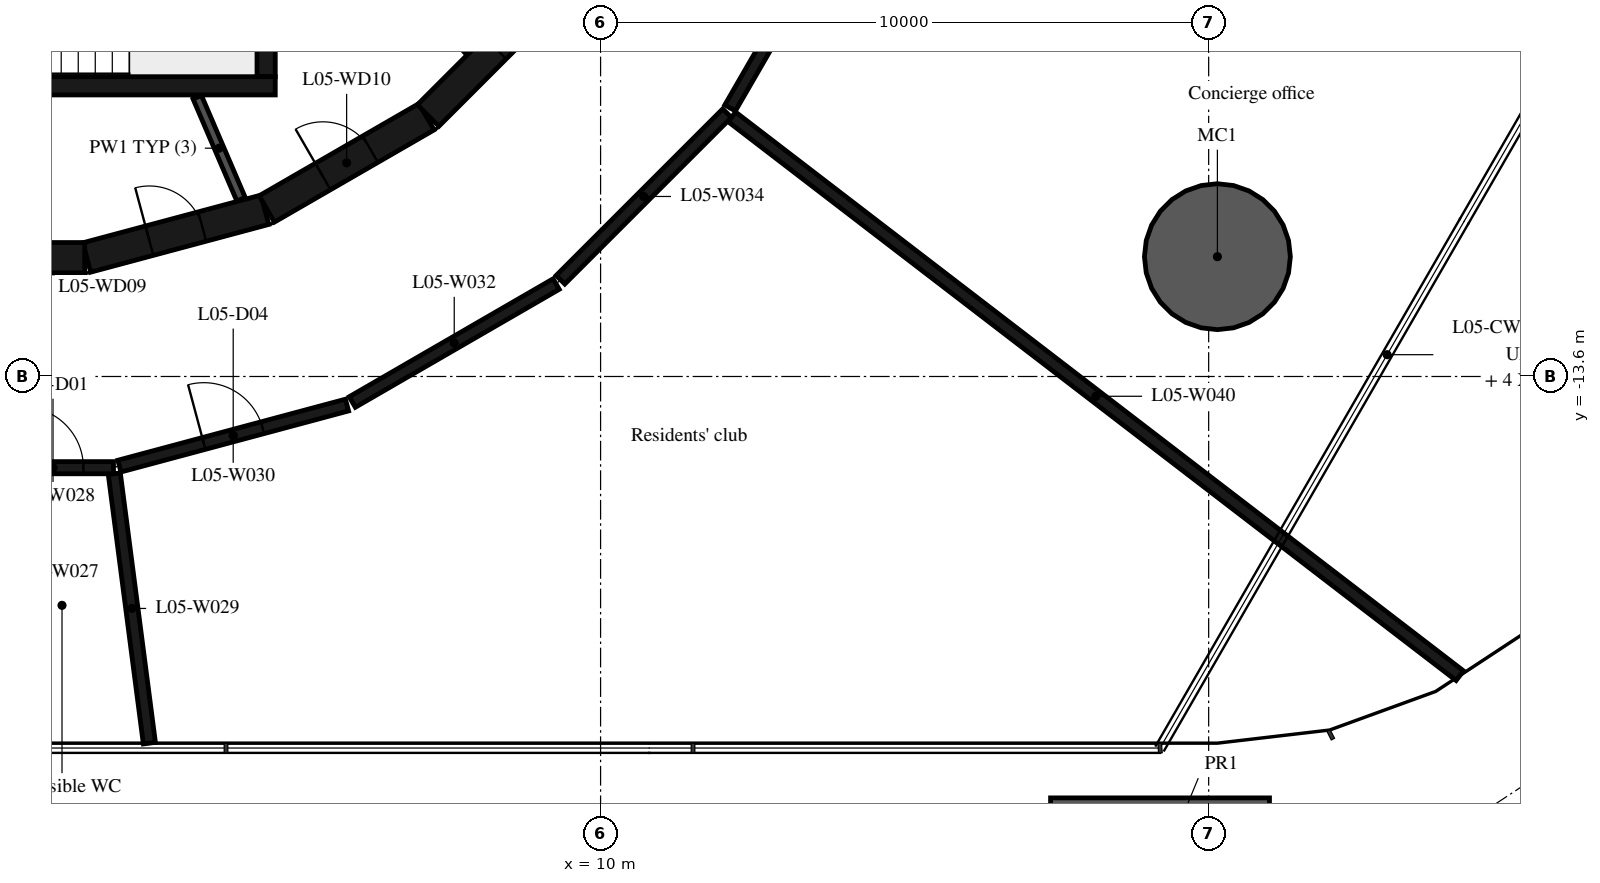
"""IFC4 building model, lengths in metres.
Left out: names, types, materials, properties, quantities, classifications, styles, units other than length and angle.
Written with IfcOpenShell. Run it as: python <this file> out.ifc"""

import sys

from ifc_helpers import new_model, si_unit, direction, frame, frame_2d, origin, origin_2d, place, context, subcontext, project, spatial, rectangle, hollow_circle, extrude, element, fill, save


model = new_model("IFC4")
c1 = context("Model", 3, precision=1e-05, world=origin(), true_north=direction((0.0, 1.0)))
c2 = subcontext(c1, "Body", "Model", "MODEL_VIEW")
j1 = project(units=[si_unit("LENGTHUNIT", "METRE"), si_unit("PLANEANGLEUNIT", "RADIAN")], contexts=[c1])
p1 = place(None, origin())
s1 = spatial("IfcSite", under=j1, at=p1, CompositionType="ELEMENT")
p2 = place(p1, origin())
s2 = spatial("IfcBuilding", under=s1, at=p2, CompositionType="ELEMENT")
p3 = place(p2, frame((0.0, 0.0, 28.2)))
s3 = spatial("IfcBuildingStorey", under=s2, at=p3, CompositionType="ELEMENT", Elevation=28.2)
p4 = place(p3, frame((20.144, -11.63, -0.38), z_axis=(0.0, 0.0, 1.0), x_axis=(1.0, 0.0, 0.0)))
e1 = element("IfcColumn", 1, at=p4, inside=s3, PredefinedType="COLUMN", context=c2, shape_type="SweptSolid", body=[
    extrude(hollow_circle(Radius=1.2, WallThickness=0.06, at=origin_2d()), origin(), (0.0, 0.0, 1.0), 4.73),
])
p5 = place(p3, frame((19.2, -21.73, -0.38), z_axis=(0.0, 0.0, 1.0), x_axis=(1.0, 0.0, 0.0)))
e2 = element("IfcColumn", 2, at=p5, inside=s3, PredefinedType="COLUMN", context=c2, shape_type="SweptSolid", body=[
    extrude(rectangle(XDim=3.6, YDim=2.4, at=origin_2d()), origin(), (0.0, 0.0, 1.0), 3.722),
])
p6 = place(p3, frame((1.55, -11.643, 0.0), z_axis=(0.0, 0.0, 1.0), x_axis=(0.965948410781, 0.258734743916, 0.0)))
e3 = element("IfcWall", 3, at=p6, inside=s3, PredefinedType="SHEAR", context=c2, shape_type="SweptSolid", body=[
    extrude(rectangle(XDim=3.033, YDim=0.5, at=frame_2d((1.516, 0.0))), origin(), (0.0, 0.0, 1.0), 4.35),
])
p7 = place(p6, frame((1.066, 0.0, 0.0)))
e4 = element("IfcOpeningElement", 4, at=p7, cuts=e3, PredefinedType="OPENING", context=c2, shape_type="SweptSolid", body=[
    extrude(rectangle(XDim=0.9, YDim=2.1, at=frame_2d((0.45, 1.05))), frame((0.0, 0.26, 0.0), z_axis=(0.0, -1.0, 0.0), x_axis=(1.0, 0.0, 0.0)), (0.0, 0.0, 1.0), 0.52),
])
p8 = place(p3, frame((4.51, -10.845, 0.0), z_axis=(0.0, 0.0, 1.0), x_axis=(0.865975092491, 0.500087131594, 0.0)))
e5 = element("IfcWall", 5, at=p8, inside=s3, PredefinedType="SHEAR", context=c2, shape_type="SweptSolid", body=[
    extrude(rectangle(XDim=3.033, YDim=0.5, at=frame_2d((1.516, 0.0))), origin(), (0.0, 0.0, 1.0), 4.35),
])
p9 = place(p8, frame((1.066, 0.0, 0.0)))
e6 = element("IfcOpeningElement", 6, at=p9, cuts=e5, PredefinedType="OPENING", context=c2, shape_type="SweptSolid", body=[
    extrude(rectangle(XDim=0.9, YDim=2.1, at=frame_2d((0.45, 1.05))), frame((0.0, 0.26, 0.0), z_axis=(0.0, -1.0, 0.0), x_axis=(1.0, 0.0, 0.0)), (0.0, 0.0, 1.0), 0.52),
])
p10 = place(p3, frame((7.164, -9.308, 0.0), z_axis=(0.0, 0.0, 1.0), x_axis=(0.707106781187, 0.707106781187, 0.0)))
e7 = element("IfcWall", 7, at=p10, inside=s3, PredefinedType="SHEAR", context=c2, shape_type="SweptSolid", body=[
    extrude(rectangle(XDim=3.032, YDim=0.5, at=frame_2d((1.516, 0.0))), origin(), (0.0, 0.0, 1.0), 4.35),
])
p11 = place(p10, frame((1.566, 0.0, 0.0)))
e8 = element("IfcOpeningElement", 8, at=p11, cuts=e7, PredefinedType="OPENING", context=c2, shape_type="SweptSolid", body=[
    extrude(rectangle(XDim=0.9, YDim=2.1, at=frame_2d((0.45, 1.05))), frame((0.0, 0.26, 0.0), z_axis=(0.0, -1.0, 0.0), x_axis=(1.0, 0.0, 0.0)), (0.0, 0.0, 1.0), 0.52),
])
p12 = place(p3, frame((-1.516, -11.647, 0.0), z_axis=(0.0, 0.0, 1.0), x_axis=(1.0, 0.0, 0.0)))
e9 = element("IfcWall", 9, at=p12, inside=s3, PredefinedType="SHEAR", context=c2, shape_type="SweptSolid", body=[
    extrude(rectangle(XDim=3.033, YDim=0.5, at=frame_2d((1.516, 0.0))), origin(), (0.0, 0.0, 1.0), 4.35),
])
p13 = place(p12, frame((0.016, 0.0, 0.0)))
e10 = element("IfcOpeningElement", 10, at=p13, cuts=e9, PredefinedType="OPENING", context=c2, shape_type="SweptSolid", body=[
    extrude(rectangle(XDim=1.2, YDim=2.1, at=frame_2d((0.6, 1.05))), frame((0.0, 0.26, 0.0), z_axis=(0.0, -1.0, 0.0), x_axis=(1.0, 0.0, 0.0)), (0.0, 0.0, 1.0), 0.52),
])
p14 = place(p3, frame((4.5, -8.67, 0.0), z_axis=(0.0, 0.0, 1.0), x_axis=(0.0, 1.0, 0.0)))
e11 = element("IfcWall", 11, at=p14, inside=s3, PredefinedType="SHEAR", context=c2, shape_type="SweptSolid", body=[
    extrude(rectangle(XDim=3.32, YDim=0.3, at=frame_2d((1.66, 0.0))), origin(), (0.0, 0.0, 1.0), 4.35),
])
p15 = place(p3, frame((0.1, -8.82, 0.0), z_axis=(0.0, 0.0, 1.0), x_axis=(1.0, 0.0, 0.0)))
e12 = element("IfcWall", 12, at=p15, inside=s3, PredefinedType="SHEAR", context=c2, shape_type="SweptSolid", body=[
    extrude(rectangle(XDim=4.55, YDim=0.3, at=frame_2d((2.275, 0.0))), origin(), (0.0, 0.0, 1.0), 4.35),
])
p16 = place(p3, frame((7.842, -8.248, 0.0), z_axis=(0.0, 0.0, 1.0), x_axis=(-0.66446128181, 0.747322691329, 0.0)))
e13 = element("IfcWall", 13, at=p16, inside=s3, PredefinedType="PARTITIONING", context=c2, shape_type="SweptSolid", body=[
    extrude(rectangle(XDim=4.198, YDim=0.15, at=frame_2d((2.099, 0.0))), origin(), (0.0, 0.0, 1.0), 4.35),
])
p17 = place(p3, frame((3.367, -9.007, 0.0), z_axis=(0.0, 0.0, 1.0), x_axis=(0.394387482265, -0.918944238696, 0.0)))
e14 = element("IfcWall", 14, at=p17, inside=s3, PredefinedType="PARTITIONING", context=c2, shape_type="SweptSolid", body=[
    extrude(rectangle(XDim=1.825, YDim=0.15, at=frame_2d((0.913, 0.0))), origin(), (0.0, 0.0, 1.0), 4.35),
])
p18 = place(p3, frame((0.0, -15.1, 0.0), z_axis=(0.0, 0.0, 1.0), x_axis=(1.0, 0.0, 0.0)))
e15 = element("IfcWall", 15, at=p18, inside=s3, PredefinedType="PARTITIONING", context=c2, shape_type="SweptSolid", body=[
    extrude(rectangle(XDim=1.99, YDim=0.2, at=frame_2d((0.995, 0.0))), origin(), (0.0, 0.0, 1.0), 4.35),
])
p19 = place(p18, frame((0.495, 0.0, 0.0)))
e16 = element("IfcOpeningElement", 16, at=p19, cuts=e15, PredefinedType="OPENING", context=c2, shape_type="SweptSolid", body=[
    extrude(rectangle(XDim=1.0, YDim=2.1, at=frame_2d((0.5, 1.05))), frame((0.0, 0.11, 0.0), z_axis=(0.0, -1.0, 0.0), x_axis=(1.0, 0.0, 0.0)), (0.0, 0.0, 1.0), 0.22),
])
p20 = place(p3, frame((2.003, -15.199, 0.0), z_axis=(0.0, 0.0, 1.0), x_axis=(0.129170993983, -0.991622334517, 0.0)))
e17 = element("IfcWall", 17, at=p20, inside=s3, PredefinedType="PARTITIONING", context=c2, shape_type="SweptSolid", body=[
    extrude(rectangle(XDim=4.468, YDim=0.2, at=frame_2d((2.234, 0.0))), origin(), (0.0, 0.0, 1.0), 4.35),
])
p21 = place(p3, frame((2.087, -15.074, 0.0), z_axis=(0.0, 0.0, 1.0), x_axis=(0.965870133458, 0.259026804199, 0.0)))
e18 = element("IfcWall", 18, at=p21, inside=s3, PredefinedType="PARTITIONING", context=c2, shape_type="SweptSolid", body=[
    extrude(rectangle(XDim=3.876, YDim=0.2, at=frame_2d((1.938, 0.0))), origin(), (0.0, 0.0, 1.0), 4.35),
])
p22 = place(p21, frame((1.438, 0.0, 0.0)))
e19 = element("IfcOpeningElement", 19, at=p22, cuts=e18, PredefinedType="OPENING", context=c2, shape_type="SweptSolid", body=[
    extrude(rectangle(XDim=1.0, YDim=2.1, at=frame_2d((0.5, 1.05))), frame((0.0, 0.11, 0.0), z_axis=(0.0, -1.0, 0.0), x_axis=(1.0, 0.0, 0.0)), (0.0, 0.0, 1.0), 0.22),
])
p23 = place(p3, frame((5.917, -14.02, 0.0), z_axis=(0.0, 0.0, 1.0), x_axis=(0.865601686425, 0.500733182901, 0.0)))
e20 = element("IfcWall", 20, at=p23, inside=s3, PredefinedType="PARTITIONING", context=c2, shape_type="SweptSolid", body=[
    extrude(rectangle(XDim=3.874, YDim=0.2, at=frame_2d((1.937, 0.0))), origin(), (0.0, 0.0, 1.0), 4.35),
])
p24 = place(p3, frame((9.341, -12.009, 0.0), z_axis=(0.0, 0.0, 1.0), x_axis=(0.707106781187, 0.707106781187, 0.0)))
e21 = element("IfcWall", 21, at=p24, inside=s3, PredefinedType="PARTITIONING", context=c2, shape_type="SweptSolid", body=[
    extrude(rectangle(XDim=3.874, YDim=0.2, at=frame_2d((1.937, 0.0))), origin(), (0.0, 0.0, 1.0), 4.35),
])
p25 = place(p3, frame((12.13, -9.183, 0.0), z_axis=(0.0, 0.0, 1.0), x_axis=(0.500760497952, 0.865585884642, 0.0)))
e22 = element("IfcWall", 22, at=p25, inside=s3, PredefinedType="PARTITIONING", context=c2, shape_type="SweptSolid", body=[
    extrude(rectangle(XDim=3.874, YDim=0.2, at=frame_2d((1.937, 0.0))), origin(), (0.0, 0.0, 1.0), 4.35),
])
p26 = place(p3, frame((12.159, -9.331, 0.0), z_axis=(0.0, 0.0, 1.0), x_axis=(0.793226820575, -0.608926277246, 0.0)))
e23 = element("IfcWall", 23, at=p26, inside=s3, PredefinedType="PARTITIONING", context=c2, shape_type="SweptSolid", body=[
    extrude(rectangle(XDim=15.091, YDim=0.2, at=frame_2d((7.545, 0.0))), origin(), (0.0, 0.0, 1.0), 4.35),
])
p27 = place(p7, origin())
e24 = element("IfcDoor", 24, at=p27, inside=s3, OperationType="SINGLE_SWING_RIGHT", PredefinedType="DOOR", context=c2, shape_type="SweptSolid", body=[
    extrude(rectangle(XDim=0.9, YDim=2.1, at=frame_2d((0.45, 1.05))), frame((0.0, 0.025, 0.0), z_axis=(0.0, -1.0, 0.0), x_axis=(1.0, 0.0, 0.0)), (0.0, 0.0, 1.0), 0.05),
])
fill(e4, e24)
p28 = place(p9, origin())
e25 = element("IfcDoor", 25, at=p28, inside=s3, OperationType="SINGLE_SWING_LEFT", PredefinedType="DOOR", context=c2, shape_type="SweptSolid", body=[
    extrude(rectangle(XDim=0.9, YDim=2.1, at=frame_2d((0.45, 1.05))), frame((0.0, 0.025, 0.0), z_axis=(0.0, -1.0, 0.0), x_axis=(1.0, 0.0, 0.0)), (0.0, 0.0, 1.0), 0.05),
])
fill(e6, e25)
p29 = place(p19, origin())
e26 = element("IfcDoor", 26, at=p29, inside=s3, OperationType="SINGLE_SWING_LEFT", PredefinedType="DOOR", context=c2, shape_type="SweptSolid", body=[
    extrude(rectangle(XDim=1.0, YDim=2.1, at=frame_2d((0.5, 1.05))), frame((0.0, 0.025, 0.0), z_axis=(0.0, -1.0, 0.0), x_axis=(1.0, 0.0, 0.0)), (0.0, 0.0, 1.0), 0.05),
])
fill(e16, e26)
p30 = place(p22, origin())
e27 = element("IfcDoor", 27, at=p30, inside=s3, OperationType="SINGLE_SWING_LEFT", PredefinedType="DOOR", context=c2, shape_type="SweptSolid", body=[
    extrude(rectangle(XDim=1.0, YDim=2.1, at=frame_2d((0.5, 1.05))), frame((0.0, 0.025, 0.0), z_axis=(0.0, -1.0, 0.0), x_axis=(1.0, 0.0, 0.0)), (0.0, 0.0, 1.0), 0.05),
])
fill(e19, e27)
save(model, sys.argv[1])
